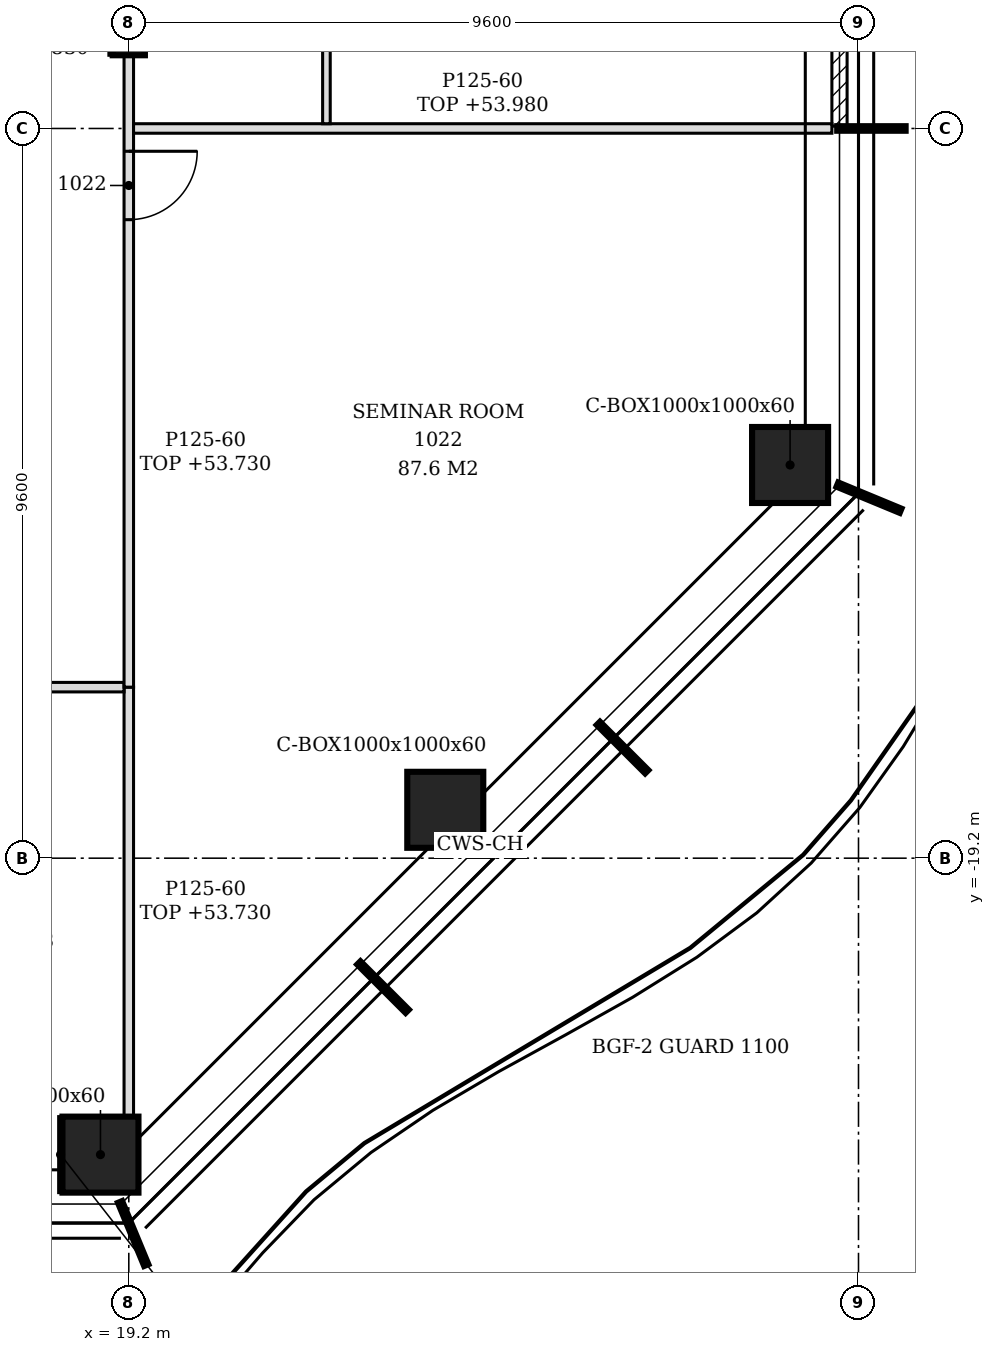
"""IFC4 building model, lengths in metres.
Left out: names, types, materials, properties, quantities, classifications, styles, units other than length and angle.
Written with IfcOpenShell. Run it as: python <this file> out.ifc"""

import sys

from ifc_helpers import new_model, si_unit, direction, frame, frame_2d, origin, origin_2d, place, context, subcontext, project, spatial, polyline, rectangle, hollow_rectangle, i_section, outline, extrude, element, fill, save


model = new_model("IFC4")
c1 = context("Model", 3, precision=1e-05, world=origin(), true_north=direction((0.0, 1.0)))
c2 = subcontext(c1, "Body", "Model", "MODEL_VIEW")
j1 = project(units=[si_unit("LENGTHUNIT", "METRE"), si_unit("PLANEANGLEUNIT", "RADIAN")], contexts=[c1])
p1 = place(None, origin())
s1 = spatial("IfcSite", under=j1, at=p1, CompositionType="ELEMENT")
p2 = place(p1, origin())
s2 = spatial("IfcBuilding", under=s1, at=p2, CompositionType="ELEMENT")
p3 = place(p2, frame((0.0, 0.0, 51.0)))
s3 = spatial("IfcBuildingStorey", under=s2, at=p3, CompositionType="ELEMENT", Elevation=51.0)
for number, where, z_axis, x_axis in (
    (1, (18.827, -23.1, -0.15), (0.0, 0.0, 1.0), (1.0, 0.0, 0.0)),
    (2, (23.364, -18.564, -0.15), (0.0, 0.0, 1.0), (1.0, 0.0, 0.0)),
    (3, (27.9, -14.027, -0.15), (0.0, 0.0, 1.0), (1.0, 0.0, 0.0)),
):
    element("IfcColumn", number, at=place(p3, frame(where, z_axis=z_axis, x_axis=x_axis)), inside=s3, PredefinedType="COLUMN", context=c2, shape_type="SweptSolid", body=[
        extrude(hollow_rectangle(XDim=1.0, YDim=1.0, WallThickness=0.06, at=origin_2d()), origin(), (0.0, 0.0, 1.0), 3.6),
    ])
p4 = place(p3, frame((19.2, -8.4, -0.15), z_axis=(0.0, 0.0, 1.0), x_axis=(1.0, 0.0, 0.0)))
e4 = element("IfcColumn", 4, at=p4, inside=s3, PredefinedType="COLUMN", context=c2, shape_type="SweptSolid", body=[
    extrude(i_section(OverallWidth=0.424, OverallDepth=0.474, WebThickness=0.048, FlangeThickness=0.077, FilletRadius=0.015, at=origin_2d()), origin(), (0.0, 0.0, 1.0), 3.6),
])
p5 = place(p3, frame((28.55, -9.57, 0.0), z_axis=(0.0, 0.0, 1.0), x_axis=(0.0, 1.0, 0.0)))
e5 = element("IfcWall", 5, at=p5, inside=s3, PredefinedType="NOTDEFINED", context=c2, shape_type="SweptSolid", body=[
    extrude(rectangle(XDim=4.74, YDim=0.2, at=frame_2d((2.37, 0.0))), origin(), (0.0, 0.0, 1.0), 3.45),
])
p6 = place(p5, frame((1.17, 0.0, 0.0)))
e6 = element("IfcOpeningElement", 6, at=p6, cuts=e5, PredefinedType="OPENING", context=c2, shape_type="SweptSolid", body=[
    extrude(rectangle(XDim=2.4, YDim=2.4, at=frame_2d((1.2, 1.2))), frame((0.0, 0.11, 0.0), z_axis=(0.0, -1.0, 0.0), x_axis=(1.0, 0.0, 0.0)), (0.0, 0.0, 1.0), 0.22),
])
p7 = place(p3, frame((19.2, -22.6, 0.0), z_axis=(0.0, 0.0, 1.0), x_axis=(0.0, 1.0, 0.0)))
e7 = element("IfcWall", 7, at=p7, inside=s3, PredefinedType="PARTITIONING", context=c2, shape_type="SweptSolid", body=[
    extrude(outline(polyline([(0.0, 0.0), (5.65, 0.0), (5.65, 2.73), (0.43, 2.73), (0.428, 2.63), (0.0, 2.63), (0.0, 0.0)])), frame((0.0, 0.062, 0.0), z_axis=(0.0, -1.0, 0.0), x_axis=(1.0, 0.0, 0.0)), (0.0, 0.0, 1.0), 0.125),
])
p8 = place(p3, frame((-21.35, -16.95, 0.0), z_axis=(0.0, 0.0, 1.0), x_axis=(1.0, 0.0, 0.0)))
e8 = element("IfcWall", 8, at=p8, inside=s3, PredefinedType="PARTITIONING", context=c2, shape_type="SweptSolid", body=[
    extrude(outline(polyline([(0.0, 0.0), (40.488, 0.0), (40.488, 2.73), (40.4, 2.73), (40.398, 3.45), (28.7, 3.45), (28.698, 2.73), (28.4, 2.73), (28.398, 3.45), (16.7, 3.45), (16.698, 2.73), (16.4, 2.73), (16.398, 3.45), (7.1, 3.45), (7.098, 2.93), (6.8, 2.93), (6.798, 3.45), (0.0, 3.45), (0.0, 0.0)])), frame((0.0, 0.062, 0.0), z_axis=(0.0, -1.0, 0.0), x_axis=(1.0, 0.0, 0.0)), (0.0, 0.0, 1.0), 0.125),
])
p9 = place(p8, frame((5.75, 0.0, 0.0)))
e9 = element("IfcOpeningElement", 9, at=p9, cuts=e8, PredefinedType="OPENING", context=c2, shape_type="SweptSolid", body=[
    extrude(rectangle(XDim=0.9, YDim=2.1, at=frame_2d((0.45, 1.05))), frame((0.0, 0.073, 0.0), z_axis=(0.0, -1.0, 0.0), x_axis=(1.0, 0.0, 0.0)), (0.0, 0.0, 1.0), 0.145),
])
p10 = place(p8, frame((10.736, 0.0, 0.0)))
e10 = element("IfcOpeningElement", 10, at=p10, cuts=e8, PredefinedType="OPENING", context=c2, shape_type="SweptSolid", body=[
    extrude(rectangle(XDim=0.9, YDim=2.1, at=frame_2d((0.45, 1.05))), frame((0.0, 0.073, 0.0), z_axis=(0.0, -1.0, 0.0), x_axis=(1.0, 0.0, 0.0)), (0.0, 0.0, 1.0), 0.145),
])
p11 = place(p8, frame((15.35, 0.0, 0.0)))
e11 = element("IfcOpeningElement", 11, at=p11, cuts=e8, PredefinedType="OPENING", context=c2, shape_type="SweptSolid", body=[
    extrude(rectangle(XDim=0.9, YDim=2.1, at=frame_2d((0.45, 1.05))), frame((0.0, 0.073, 0.0), z_axis=(0.0, -1.0, 0.0), x_axis=(1.0, 0.0, 0.0)), (0.0, 0.0, 1.0), 0.145),
])
p12 = place(p8, frame((20.15, 0.0, 0.0)))
e12 = element("IfcOpeningElement", 12, at=p12, cuts=e8, PredefinedType="OPENING", context=c2, shape_type="SweptSolid", body=[
    extrude(rectangle(XDim=0.9, YDim=2.1, at=frame_2d((0.45, 1.05))), frame((0.0, 0.073, 0.0), z_axis=(0.0, -1.0, 0.0), x_axis=(1.0, 0.0, 0.0)), (0.0, 0.0, 1.0), 0.145),
])
p13 = place(p8, frame((24.95, 0.0, 0.0)))
e13 = element("IfcOpeningElement", 13, at=p13, cuts=e8, PredefinedType="OPENING", context=c2, shape_type="SweptSolid", body=[
    extrude(rectangle(XDim=0.9, YDim=2.1, at=frame_2d((0.45, 1.05))), frame((0.0, 0.073, 0.0), z_axis=(0.0, -1.0, 0.0), x_axis=(1.0, 0.0, 0.0)), (0.0, 0.0, 1.0), 0.145),
])
p14 = place(p8, frame((29.564, 0.0, 0.0)))
e14 = element("IfcOpeningElement", 14, at=p14, cuts=e8, PredefinedType="OPENING", context=c2, shape_type="SweptSolid", body=[
    extrude(rectangle(XDim=0.9, YDim=2.1, at=frame_2d((0.45, 1.05))), frame((0.0, 0.073, 0.0), z_axis=(0.0, -1.0, 0.0), x_axis=(1.0, 0.0, 0.0)), (0.0, 0.0, 1.0), 0.145),
])
p15 = place(p8, frame((31.15, 0.0, 0.0)))
e15 = element("IfcOpeningElement", 15, at=p15, cuts=e8, PredefinedType="OPENING", context=c2, shape_type="SweptSolid", body=[
    extrude(rectangle(XDim=0.9, YDim=2.1, at=frame_2d((0.45, 1.05))), frame((0.0, 0.073, 0.0), z_axis=(0.0, -1.0, 0.0), x_axis=(1.0, 0.0, 0.0)), (0.0, 0.0, 1.0), 0.145),
])
p16 = place(p8, frame((36.05, 0.0, 0.0)))
e16 = element("IfcOpeningElement", 16, at=p16, cuts=e8, PredefinedType="OPENING", context=c2, shape_type="SweptSolid", body=[
    extrude(rectangle(XDim=0.9, YDim=2.1, at=frame_2d((0.45, 1.05))), frame((0.0, 0.073, 0.0), z_axis=(0.0, -1.0, 0.0), x_axis=(1.0, 0.0, 0.0)), (0.0, 0.0, 1.0), 0.145),
])
p17 = place(p3, frame((19.2, -16.95, 0.0), z_axis=(0.0, 0.0, 1.0), x_axis=(0.0, 1.0, 0.0)))
e17 = element("IfcWall", 17, at=p17, inside=s3, PredefinedType="PARTITIONING", context=c2, shape_type="SweptSolid", body=[
    extrude(rectangle(XDim=8.313, YDim=0.125, at=frame_2d((4.156, 0.0))), origin(), (0.0, 0.0, 1.0), 2.73),
])
p18 = place(p17, frame((6.15, 0.0, 0.0)))
e18 = element("IfcOpeningElement", 18, at=p18, cuts=e17, PredefinedType="OPENING", context=c2, shape_type="SweptSolid", body=[
    extrude(rectangle(XDim=0.9, YDim=2.1, at=frame_2d((0.45, 1.05))), frame((0.0, 0.073, 0.0), z_axis=(0.0, -1.0, 0.0), x_axis=(1.0, 0.0, 0.0)), (0.0, 0.0, 1.0), 0.145),
])
p19 = place(p3, frame((19.262, -9.6, 0.0), z_axis=(0.0, 0.0, 1.0), x_axis=(1.0, 0.0, 0.0)))
e19 = element("IfcWall", 19, at=p19, inside=s3, PredefinedType="PARTITIONING", context=c2, shape_type="SweptSolid", body=[
    extrude(outline(polyline([(0.0, 0.0), (9.188, 0.0), (9.188, 2.98), (8.788, 2.98), (8.785, 2.93), (8.488, 2.93), (8.486, 2.98), (0.087, 2.98), (0.085, 2.73), (0.0, 2.73), (0.0, 0.0)])), frame((0.0, 0.062, 0.0), z_axis=(0.0, -1.0, 0.0), x_axis=(1.0, 0.0, 0.0)), (0.0, 0.0, 1.0), 0.125),
])
p20 = place(p3, frame((21.8, -9.538, 0.0), z_axis=(0.0, 0.0, 1.0), x_axis=(0.0, 1.0, 0.0)))
e20 = element("IfcWall", 20, at=p20, inside=s3, PredefinedType="PARTITIONING", context=c2, shape_type="SweptSolid", body=[
    extrude(outline(polyline([(0.0, 0.0), (2.288, 0.0), (2.288, 3.45), (0.032, 3.45), (0.031, 2.98), (0.0, 2.98), (0.0, 0.0)])), frame((0.0, 0.05, 0.0), z_axis=(0.0, -1.0, 0.0), x_axis=(1.0, 0.0, 0.0)), (0.0, 0.0, 1.0), 0.1),
])
p21 = place(p3, frame((18.302, -23.6, 0.0), z_axis=(0.0, 0.0, 1.0), x_axis=(0.0, 1.0, 0.0)))
e21 = element("IfcWall", 21, at=p21, inside=s3, PredefinedType="PARTITIONING", context=c2, shape_type="SweptSolid", body=[
    extrude(rectangle(XDim=1.0, YDim=0.05, at=frame_2d((0.5, 0.0))), origin(), (0.0, 0.0, 1.0), 2.93),
])
p22 = place(p3, frame((18.963, -8.637, 0.0), z_axis=(0.0, 0.0, 1.0), x_axis=(0.0, 1.0, 0.0)))
e22 = element("IfcWall", 22, at=p22, inside=s3, PredefinedType="PARTITIONING", context=c2, shape_type="SweptSolid", body=[
    extrude(rectangle(XDim=0.474, YDim=0.05, at=frame_2d((0.237, 0.0))), origin(), (0.0, 0.0, 1.0), 2.83),
])
p23 = place(p18, frame((0.9, 0.0, 0.0), z_axis=(0.0, 0.0, 1.0), x_axis=(-1.0, 0.0, 0.0)))
e23 = element("IfcDoor", 23, at=p23, inside=s3, OperationType="SINGLE_SWING_LEFT", PredefinedType="DOOR", context=c2, shape_type="SweptSolid", body=[
    extrude(rectangle(XDim=0.9, YDim=2.1, at=frame_2d((0.45, 1.05))), frame((0.0, 0.025, 0.0), z_axis=(0.0, -1.0, 0.0), x_axis=(1.0, 0.0, 0.0)), (0.0, 0.0, 1.0), 0.05),
])
fill(e18, e23)
save(model, sys.argv[1])
